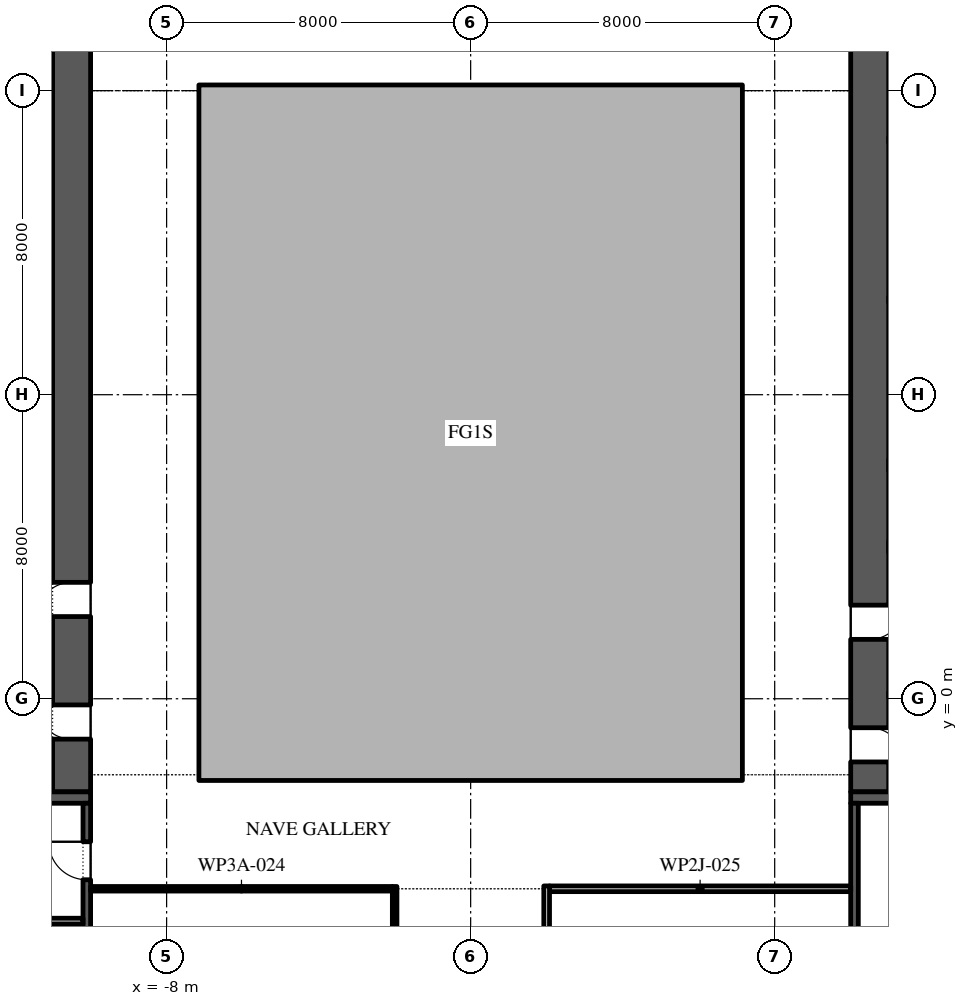
"""IFC4 building model, lengths in metres.
Left out: names, types, materials, properties, quantities, classifications, styles, units other than length and angle.
Written with IfcOpenShell. Run it as: python <this file> out.ifc"""

import sys

from ifc_helpers import new_model, si_unit, direction, frame, frame_2d, origin, place, context, subcontext, project, spatial, polyline, rectangle, outline, extrude, element, fill, save


model = new_model("IFC4")
c1 = context("Model", 3, precision=1e-05, world=origin(), true_north=direction((0.0, 1.0)))
c2 = subcontext(c1, "Body", "Model", "MODEL_VIEW")
j1 = project(units=[si_unit("LENGTHUNIT", "METRE"), si_unit("PLANEANGLEUNIT", "RADIAN")], contexts=[c1])
p1 = place(None, origin())
s1 = spatial("IfcSite", under=j1, at=p1, CompositionType="ELEMENT")
p2 = place(p1, origin())
s2 = spatial("IfcBuilding", under=s1, at=p2, CompositionType="ELEMENT")
p3 = place(p2, frame((0.0, 0.0, 28.8)))
s3 = spatial("IfcBuildingStorey", under=s2, at=p3, CompositionType="ELEMENT", Elevation=28.8)
p4 = place(p3, origin())
e1 = element("IfcWall", 1, at=p4, inside=s3, PredefinedType="STANDARD", context=c2, shape_type="SweptSolid", body=[
    extrude(outline(polyline([(-7.15, -2.15), (7.15, -2.15), (7.15, 16.15), (-7.15, 16.15), (-7.15, -2.15)]), holes=[polyline([(-7.0, -2.0), (-7.0, 16.0), (7.0, 16.0), (7.0, -2.0), (-7.0, -2.0)])]), origin(), (0.0, 0.0, 1.0), 4.35),
])
p5 = place(p3, frame((-10.5, -2.45, 0.0), z_axis=(0.0, 0.0, 1.0), x_axis=(0.0, 1.0, 0.0)))
e2 = element("IfcWall", 2, at=p5, inside=s3, PredefinedType="SHEAR", context=c2, shape_type="SweptSolid", body=[
    extrude(rectangle(XDim=27.9, YDim=1.0, at=frame_2d((13.95, 0.0))), origin(), (0.0, 0.0, 1.0), 4.35),
])
p6 = place(p5, frame((23.65, 0.0, 0.0)))
e3 = element("IfcOpeningElement", 3, at=p6, cuts=e2, PredefinedType="OPENING", context=c2, shape_type="SweptSolid", body=[
    extrude(rectangle(XDim=2.4, YDim=2.1, at=frame_2d((1.2, 1.05))), frame((0.0, 0.51, 0.0), z_axis=(0.0, -1.0, 0.0), x_axis=(1.0, 0.0, 0.0)), (0.0, 0.0, 1.0), 1.02),
])
p7 = place(p5, frame((1.387, 0.0, 0.0)))
e4 = element("IfcOpeningElement", 4, at=p7, cuts=e2, PredefinedType="OPENING", context=c2, shape_type="SweptSolid", body=[
    extrude(rectangle(XDim=0.9, YDim=2.1, at=frame_2d((0.45, 1.05))), frame((0.0, 0.51, 0.0), z_axis=(0.0, -1.0, 0.0), x_axis=(1.0, 0.0, 0.0)), (0.0, 0.0, 1.0), 1.02),
])
p8 = place(p5, frame((4.613, 0.0, 0.0)))
e5 = element("IfcOpeningElement", 5, at=p8, cuts=e2, PredefinedType="OPENING", context=c2, shape_type="SweptSolid", body=[
    extrude(rectangle(XDim=0.9, YDim=2.1, at=frame_2d((0.45, 1.05))), frame((0.0, 0.51, 0.0), z_axis=(0.0, -1.0, 0.0), x_axis=(1.0, 0.0, 0.0)), (0.0, 0.0, 1.0), 1.02),
])
p9 = place(p3, frame((-22.0, -2.6, 0.0), z_axis=(0.0, 0.0, 1.0), x_axis=(1.0, 0.0, 0.0)))
e6 = element("IfcWall", 6, at=p9, inside=s3, PredefinedType="SHEAR", context=c2, shape_type="SweptSolid", body=[
    extrude(rectangle(XDim=12.0, YDim=0.3, at=frame_2d((6.0, 0.0))), origin(), (0.0, 0.0, 1.0), 4.35),
])
p10 = place(p3, frame((-10.1, -15.8, 0.0), z_axis=(0.0, 0.0, 1.0), x_axis=(0.0, 1.0, 0.0)))
e7 = element("IfcWall", 7, at=p10, inside=s3, PredefinedType="SHEAR", context=c2, shape_type="SweptSolid", body=[
    extrude(rectangle(XDim=13.05, YDim=0.2, at=frame_2d((6.525, 0.0))), origin(), (0.0, 0.0, 1.0), 4.35),
])
p11 = place(p10, frame((4.488, 0.0, 0.0)))
e8 = element("IfcOpeningElement", 8, at=p11, cuts=e7, PredefinedType="OPENING", context=c2, shape_type="SweptSolid", body=[
    extrude(rectangle(XDim=0.9, YDim=2.1, at=frame_2d((0.45, 1.05))), frame((0.0, 0.11, 0.0), z_axis=(0.0, -1.0, 0.0), x_axis=(1.0, 0.0, 0.0)), (0.0, 0.0, 1.0), 0.22),
])
p12 = place(p10, frame((11.038, 0.0, 0.0)))
e9 = element("IfcOpeningElement", 9, at=p12, cuts=e7, PredefinedType="OPENING", context=c2, shape_type="SweptSolid", body=[
    extrude(rectangle(XDim=1.0, YDim=2.1, at=frame_2d((0.5, 1.05))), frame((0.0, 0.11, 0.0), z_axis=(0.0, -1.0, 0.0), x_axis=(1.0, 0.0, 0.0)), (0.0, 0.0, 1.0), 0.22),
])
p13 = place(p3, frame((-21.8, -5.85, 0.0), z_axis=(0.0, 0.0, 1.0), x_axis=(1.0, 0.0, 0.0)))
e10 = element("IfcWall", 10, at=p13, inside=s3, PredefinedType="PARTITIONING", context=c2, shape_type="SweptSolid", body=[
    extrude(rectangle(XDim=11.6, YDim=0.15, at=frame_2d((5.8, 0.0))), origin(), (0.0, 0.0, 1.0), 4.35),
])
p14 = place(p3, frame((10.5, -2.45, 0.0), z_axis=(0.0, 0.0, 1.0), x_axis=(0.0, 1.0, 0.0)))
e11 = element("IfcWall", 11, at=p14, inside=s3, PredefinedType="SHEAR", context=c2, shape_type="SweptSolid", body=[
    extrude(rectangle(XDim=27.9, YDim=1.0, at=frame_2d((13.95, 0.0))), origin(), (0.0, 0.0, 1.0), 4.35),
])
p15 = place(p14, frame((23.65, 0.0, 0.0)))
e12 = element("IfcOpeningElement", 12, at=p15, cuts=e11, PredefinedType="OPENING", context=c2, shape_type="SweptSolid", body=[
    extrude(rectangle(XDim=2.4, YDim=2.1, at=frame_2d((1.2, 1.05))), frame((0.0, 0.51, 0.0), z_axis=(0.0, -1.0, 0.0), x_axis=(1.0, 0.0, 0.0)), (0.0, 0.0, 1.0), 1.02),
])
p16 = place(p14, frame((0.788, 0.0, 0.0)))
e13 = element("IfcOpeningElement", 13, at=p16, cuts=e11, PredefinedType="OPENING", context=c2, shape_type="SweptSolid", body=[
    extrude(rectangle(XDim=0.9, YDim=2.1, at=frame_2d((0.45, 1.05))), frame((0.0, 0.51, 0.0), z_axis=(0.0, -1.0, 0.0), x_axis=(1.0, 0.0, 0.0)), (0.0, 0.0, 1.0), 1.02),
])
p17 = place(p14, frame((4.012, 0.0, 0.0)))
e14 = element("IfcOpeningElement", 14, at=p17, cuts=e11, PredefinedType="OPENING", context=c2, shape_type="SweptSolid", body=[
    extrude(rectangle(XDim=0.9, YDim=2.1, at=frame_2d((0.45, 1.05))), frame((0.0, 0.51, 0.0), z_axis=(0.0, -1.0, 0.0), x_axis=(1.0, 0.0, 0.0)), (0.0, 0.0, 1.0), 1.02),
])
p18 = place(p3, frame((10.0, -2.6, 0.0), z_axis=(0.0, 0.0, 1.0), x_axis=(1.0, 0.0, 0.0)))
e15 = element("IfcWall", 15, at=p18, inside=s3, PredefinedType="SHEAR", context=c2, shape_type="SweptSolid", body=[
    extrude(rectangle(XDim=12.0, YDim=0.3, at=frame_2d((6.0, 0.0))), origin(), (0.0, 0.0, 1.0), 4.35),
])
p19 = place(p3, frame((10.1, -15.8, 0.0), z_axis=(0.0, 0.0, 1.0), x_axis=(0.0, 1.0, 0.0)))
e16 = element("IfcWall", 16, at=p19, inside=s3, PredefinedType="SHEAR", context=c2, shape_type="SweptSolid", body=[
    extrude(rectangle(XDim=13.05, YDim=0.2, at=frame_2d((6.525, 0.0))), origin(), (0.0, 0.0, 1.0), 4.35),
])
p20 = place(p19, frame((6.075, 0.0, 0.0)))
e17 = element("IfcOpeningElement", 17, at=p20, cuts=e16, PredefinedType="OPENING", context=c2, shape_type="SweptSolid", body=[
    extrude(rectangle(XDim=0.9, YDim=2.1, at=frame_2d((0.45, 1.05))), frame((0.0, 0.11, 0.0), z_axis=(0.0, -1.0, 0.0), x_axis=(1.0, 0.0, 0.0)), (0.0, 0.0, 1.0), 0.22),
])
p21 = place(p3, frame((-10.0, -5.0, 0.0), z_axis=(0.0, 0.0, 1.0), x_axis=(1.0, 0.0, 0.0)))
e18 = element("IfcWall", 18, at=p21, inside=s3, PredefinedType="PARTITIONING", context=c2, shape_type="SweptSolid", body=[
    extrude(rectangle(XDim=7.94, YDim=0.12, at=frame_2d((3.97, 0.0))), origin(), (0.0, 0.0, 1.0), 4.35),
])
p22 = place(p3, frame((2.075, -5.0, 0.0), z_axis=(0.0, 0.0, 1.0), x_axis=(1.0, 0.0, 0.0)))
e19 = element("IfcWall", 19, at=p22, inside=s3, PredefinedType="PARTITIONING", context=c2, shape_type="SweptSolid", body=[
    extrude(rectangle(XDim=7.925, YDim=0.15, at=frame_2d((3.962, 0.0))), origin(), (0.0, 0.0, 1.0), 4.35),
])
p23 = place(p3, frame((-2.0, -13.0, 0.0), z_axis=(0.0, 0.0, 1.0), x_axis=(0.0, 1.0, 0.0)))
e20 = element("IfcWall", 20, at=p23, inside=s3, PredefinedType="PARTITIONING", context=c2, shape_type="SweptSolid", body=[
    extrude(rectangle(XDim=8.06, YDim=0.12, at=frame_2d((4.03, 0.0))), origin(), (0.0, 0.0, 1.0), 4.35),
])
p24 = place(p23, frame((3.53, 0.0, 0.0)))
e21 = element("IfcOpeningElement", 21, at=p24, cuts=e20, PredefinedType="OPENING", context=c2, shape_type="SweptSolid", body=[
    extrude(rectangle(XDim=1.0, YDim=2.1, at=frame_2d((0.5, 1.05))), frame((0.0, 0.07, 0.0), z_axis=(0.0, -1.0, 0.0), x_axis=(1.0, 0.0, 0.0)), (0.0, 0.0, 1.0), 0.14),
])
p25 = place(p3, frame((2.0, -17.5, 0.0), z_axis=(0.0, 0.0, 1.0), x_axis=(0.0, 1.0, 0.0)))
e22 = element("IfcWall", 22, at=p25, inside=s3, PredefinedType="PARTITIONING", context=c2, shape_type="SweptSolid", body=[
    extrude(rectangle(XDim=12.575, YDim=0.15, at=frame_2d((6.288, 0.0))), origin(), (0.0, 0.0, 1.0), 4.35),
])
p26 = place(p25, frame((5.788, 0.0, 0.0)))
e23 = element("IfcOpeningElement", 23, at=p26, cuts=e22, PredefinedType="OPENING", context=c2, shape_type="SweptSolid", body=[
    extrude(rectangle(XDim=1.0, YDim=2.1, at=frame_2d((0.5, 1.05))), frame((0.0, 0.085, 0.0), z_axis=(0.0, -1.0, 0.0), x_axis=(1.0, 0.0, 0.0)), (0.0, 0.0, 1.0), 0.17),
])
p27 = place(p7, origin())
e24 = element("IfcDoor", 24, at=p27, inside=s3, OperationType="SINGLE_SWING_LEFT", PredefinedType="DOOR", context=c2, shape_type="SweptSolid", body=[
    extrude(rectangle(XDim=0.9, YDim=2.1, at=frame_2d((0.45, 1.05))), frame((0.0, 0.5, 0.0), z_axis=(0.0, -1.0, 0.0), x_axis=(1.0, 0.0, 0.0)), (0.0, 0.0, 1.0), 0.05),
])
fill(e4, e24)
p28 = place(p8, origin())
e25 = element("IfcDoor", 25, at=p28, inside=s3, OperationType="SINGLE_SWING_RIGHT", PredefinedType="DOOR", context=c2, shape_type="SweptSolid", body=[
    extrude(rectangle(XDim=0.9, YDim=2.1, at=frame_2d((0.45, 1.05))), frame((0.0, 0.5, 0.0), z_axis=(0.0, -1.0, 0.0), x_axis=(1.0, 0.0, 0.0)), (0.0, 0.0, 1.0), 0.05),
])
fill(e5, e25)
p29 = place(p12, origin())
e26 = element("IfcDoor", 26, at=p29, inside=s3, OperationType="SINGLE_SWING_LEFT", PredefinedType="DOOR", context=c2, shape_type="SweptSolid", body=[
    extrude(rectangle(XDim=1.0, YDim=2.1, at=frame_2d((0.5, 1.05))), frame((0.0, 0.1, 0.0), z_axis=(0.0, -1.0, 0.0), x_axis=(1.0, 0.0, 0.0)), (0.0, 0.0, 1.0), 0.05),
])
fill(e9, e26)
p30 = place(p16, frame((0.9, -0.95, 0.0), z_axis=(0.0, 0.0, 1.0), x_axis=(-1.0, 0.0, 0.0)))
e27 = element("IfcDoor", 27, at=p30, inside=s3, OperationType="SINGLE_SWING_LEFT", PredefinedType="DOOR", context=c2, shape_type="SweptSolid", body=[
    extrude(rectangle(XDim=0.9, YDim=2.1, at=frame_2d((0.45, 1.05))), frame((0.0, -0.45, 0.0), z_axis=(0.0, -1.0, 0.0), x_axis=(1.0, 0.0, 0.0)), (0.0, 0.0, 1.0), 0.05),
])
fill(e13, e27)
p31 = place(p17, frame((0.9, -0.95, 0.0), z_axis=(0.0, 0.0, 1.0), x_axis=(-1.0, 0.0, 0.0)))
e28 = element("IfcDoor", 28, at=p31, inside=s3, OperationType="SINGLE_SWING_RIGHT", PredefinedType="DOOR", context=c2, shape_type="SweptSolid", body=[
    extrude(rectangle(XDim=0.9, YDim=2.1, at=frame_2d((0.45, 1.05))), frame((0.0, -0.45, 0.0), z_axis=(0.0, -1.0, 0.0), x_axis=(1.0, 0.0, 0.0)), (0.0, 0.0, 1.0), 0.05),
])
fill(e14, e28)
save(model, sys.argv[1])
